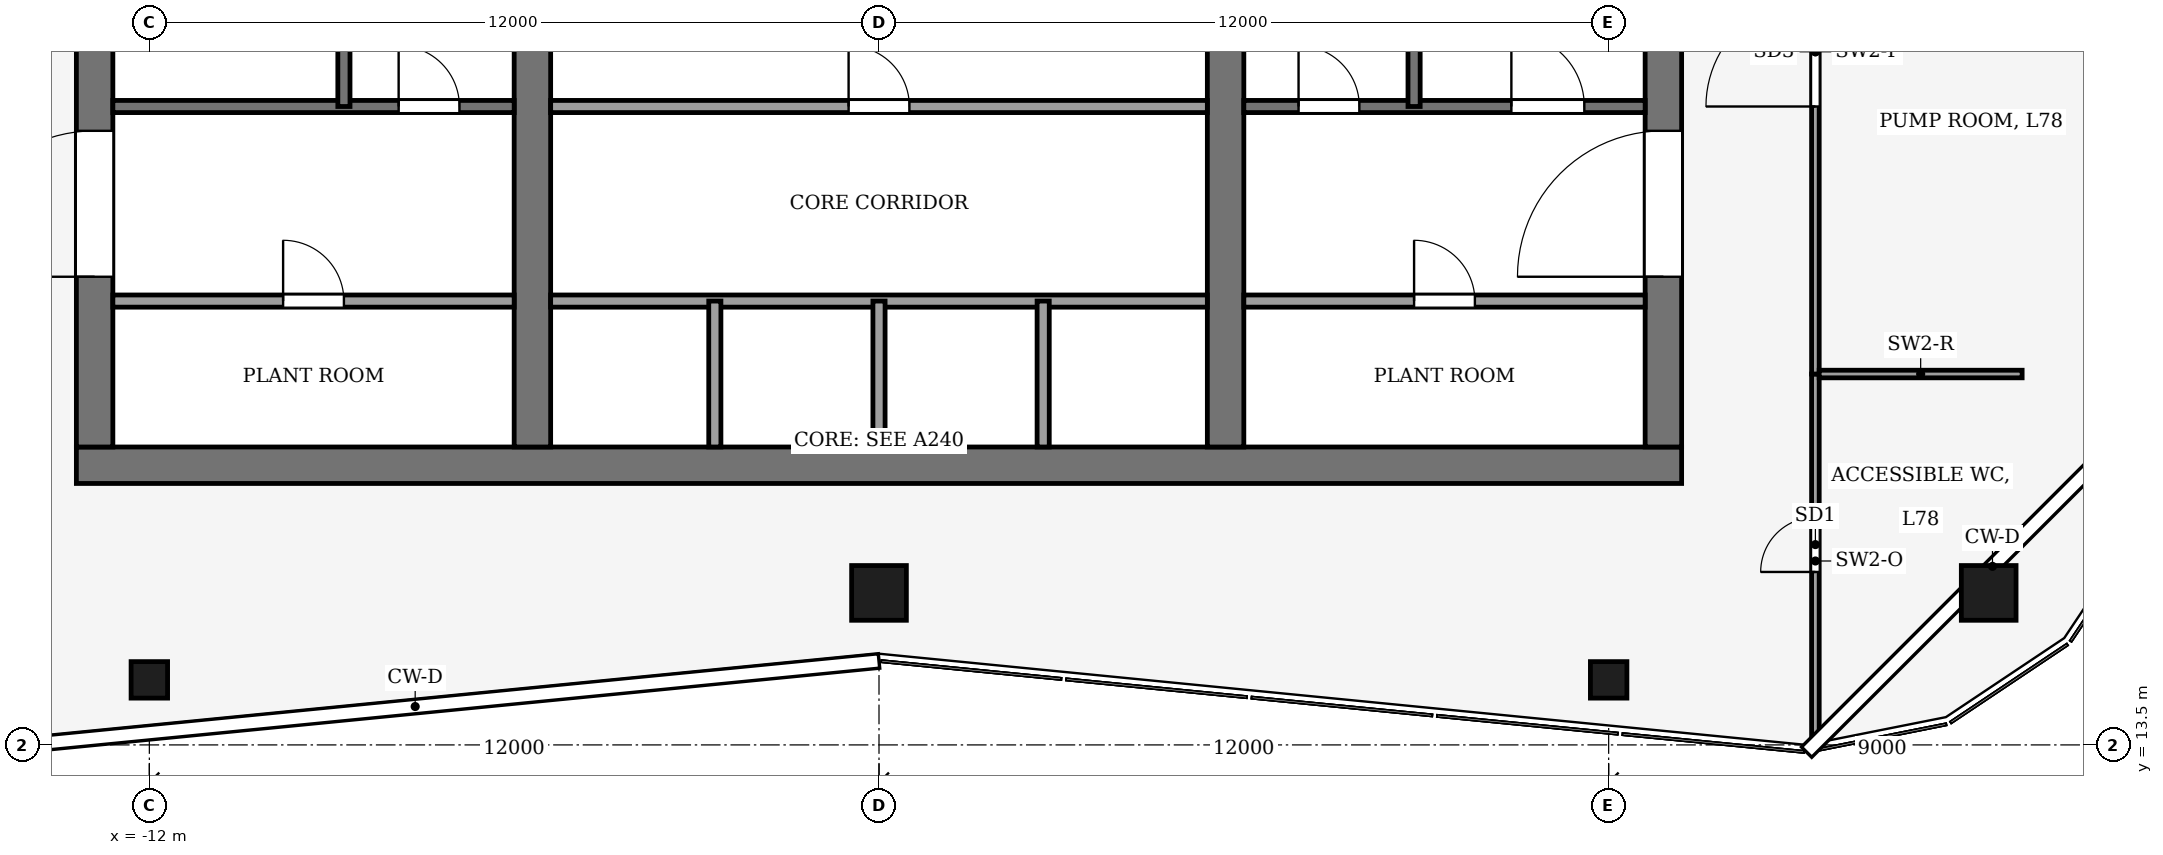
"""IFC4 building model, lengths in metres.
Left out: names, types, materials, properties, quantities, classifications, styles, units other than length and angle.
Written with IfcOpenShell. Run it as: python <this file> out.ifc"""

import sys

from ifc_helpers import new_model, si_unit, direction, frame, frame_2d, origin, origin_2d, place, context, subcontext, project, spatial, rectangle, hollow_rectangle, extrude, element, fill, save


model = new_model("IFC4")
c1 = context("Model", 3, precision=1e-05, world=origin(), true_north=direction((0.0, 1.0)))
c2 = subcontext(c1, "Body", "Model", "MODEL_VIEW")
j1 = project(units=[si_unit("LENGTHUNIT", "METRE"), si_unit("PLANEANGLEUNIT", "RADIAN")], contexts=[c1])
p1 = place(None, origin())
s1 = spatial("IfcSite", under=j1, at=p1, CompositionType="ELEMENT")
p2 = place(p1, origin())
s2 = spatial("IfcBuilding", under=s1, at=p2, CompositionType="ELEMENT")
p3 = place(p2, frame((0.0, 0.0, 340.5)))
s3 = spatial("IfcBuildingStorey", under=s2, at=p3, CompositionType="ELEMENT", Elevation=340.5)
p4 = place(p3, frame((-13.2, 18.1, -0.15), z_axis=(0.0, 0.0, 1.0), x_axis=(1.0, 0.0, 0.0)))
e1 = element("IfcWall", 1, at=p4, inside=s3, PredefinedType="SHEAR", context=c2, shape_type="SweptSolid", body=[
    extrude(rectangle(XDim=26.4, YDim=0.6, at=frame_2d((13.2, 0.0))), origin(), (0.0, 0.0, 1.0), 9.0),
])
p5 = place(p3, frame((-12.9, 18.4, -0.15), z_axis=(0.0, 0.0, 1.0), x_axis=(0.0, 1.0, 0.0)))
e2 = element("IfcWall", 2, at=p5, inside=s3, PredefinedType="SHEAR", context=c2, shape_type="SweptSolid", body=[
    extrude(rectangle(XDim=19.2, YDim=0.6, at=frame_2d((9.6, 0.0))), origin(), (0.0, 0.0, 1.0), 9.0),
])
p6 = place(p5, frame((2.8, 0.0, 0.15)))
e3 = element("IfcOpeningElement", 3, at=p6, cuts=e2, PredefinedType="OPENING", context=c2, shape_type="SweptSolid", body=[
    extrude(rectangle(XDim=2.4, YDim=2.4, at=frame_2d((1.2, 1.2))), frame((0.0, 0.31, 0.0), z_axis=(0.0, -1.0, 0.0), x_axis=(1.0, 0.0, 0.0)), (0.0, 0.0, 1.0), 0.62),
])
p7 = place(p5, frame((13.4, 0.0, 0.15)))
e4 = element("IfcOpeningElement", 4, at=p7, cuts=e2, PredefinedType="OPENING", context=c2, shape_type="SweptSolid", body=[
    extrude(rectangle(XDim=1.4, YDim=2.2, at=frame_2d((0.7, 1.1))), frame((0.0, 0.31, 0.0), z_axis=(0.0, -1.0, 0.0), x_axis=(1.0, 0.0, 0.0)), (0.0, 0.0, 1.0), 0.62),
])
p8 = place(p3, frame((12.9, 18.4, -0.15), z_axis=(0.0, 0.0, 1.0), x_axis=(0.0, 1.0, 0.0)))
e5 = element("IfcWall", 5, at=p8, inside=s3, PredefinedType="SHEAR", context=c2, shape_type="SweptSolid", body=[
    extrude(rectangle(XDim=19.2, YDim=0.6, at=frame_2d((9.6, 0.0))), origin(), (0.0, 0.0, 1.0), 9.0),
])
p9 = place(p8, frame((2.8, 0.0, 0.15)))
e6 = element("IfcOpeningElement", 6, at=p9, cuts=e5, PredefinedType="OPENING", context=c2, shape_type="SweptSolid", body=[
    extrude(rectangle(XDim=2.4, YDim=2.4, at=frame_2d((1.2, 1.2))), frame((0.0, 0.31, 0.0), z_axis=(0.0, -1.0, 0.0), x_axis=(1.0, 0.0, 0.0)), (0.0, 0.0, 1.0), 0.62),
])
p10 = place(p8, frame((13.3, 0.0, 0.15)))
e7 = element("IfcOpeningElement", 7, at=p10, cuts=e5, PredefinedType="OPENING", context=c2, shape_type="SweptSolid", body=[
    extrude(rectangle(XDim=2.4, YDim=2.4, at=frame_2d((1.2, 1.2))), frame((0.0, 0.31, 0.0), z_axis=(0.0, -1.0, 0.0), x_axis=(1.0, 0.0, 0.0)), (0.0, 0.0, 1.0), 0.62),
])
p11 = place(p3, frame((-5.7, 18.4, -0.15), z_axis=(0.0, 0.0, 1.0), x_axis=(0.0, 1.0, 0.0)))
e8 = element("IfcWall", 8, at=p11, inside=s3, PredefinedType="SHEAR", context=c2, shape_type="SweptSolid", body=[
    extrude(rectangle(XDim=19.2, YDim=0.6, at=frame_2d((9.6, 0.0))), origin(), (0.0, 0.0, 1.0), 9.0),
])
p12 = place(p11, frame((8.35, 0.0, 0.15)))
e9 = element("IfcOpeningElement", 9, at=p12, cuts=e8, PredefinedType="OPENING", context=c2, shape_type="SweptSolid", body=[
    extrude(rectangle(XDim=0.9, YDim=2.1, at=frame_2d((0.45, 1.05))), frame((0.0, 0.31, 0.0), z_axis=(0.0, -1.0, 0.0), x_axis=(1.0, 0.0, 0.0)), (0.0, 0.0, 1.0), 0.62),
])
p13 = place(p3, frame((5.7, 18.4, -0.15), z_axis=(0.0, 0.0, 1.0), x_axis=(0.0, 1.0, 0.0)))
e10 = element("IfcWall", 10, at=p13, inside=s3, PredefinedType="SHEAR", context=c2, shape_type="SweptSolid", body=[
    extrude(rectangle(XDim=19.2, YDim=0.6, at=frame_2d((9.6, 0.0))), origin(), (0.0, 0.0, 1.0), 9.0),
])
p14 = place(p13, frame((13.3, 0.0, 0.15)))
e11 = element("IfcOpeningElement", 11, at=p14, cuts=e10, PredefinedType="OPENING", context=c2, shape_type="SweptSolid", body=[
    extrude(rectangle(XDim=2.4, YDim=2.4, at=frame_2d((1.2, 1.2))), frame((0.0, 0.31, 0.0), z_axis=(0.0, -1.0, 0.0), x_axis=(1.0, 0.0, 0.0)), (0.0, 0.0, 1.0), 0.62),
])
for number, where, z_axis, x_axis in (
    (12, (18.25, 16.0, 0.0), (0.0, 0.0, 1.0), (1.0, 0.0, 0.0)),
    (13, (0.0, 16.0, 0.0), (0.0, 0.0, 1.0), (1.0, 0.0, 0.0)),
):
    element("IfcColumn", number, at=place(p3, frame(where, z_axis=z_axis, x_axis=x_axis)), inside=s3, PredefinedType="COLUMN", context=c2, shape_type="SweptSolid", body=[
        extrude(hollow_rectangle(XDim=0.9, YDim=0.9, WallThickness=0.04, at=origin_2d()), origin(), (0.0, 0.0, 1.0), 9.0),
    ])
for number, where, z_axis, x_axis in (
    (14, (-12.0, 14.57, 0.0), (0.0, 0.0, 1.0), (1.0, 0.0, 0.0)),
    (15, (12.0, 14.57, 0.0), (0.0, 0.0, 1.0), (1.0, 0.0, 0.0)),
):
    element("IfcColumn", number, at=place(p3, frame(where, z_axis=z_axis, x_axis=x_axis)), inside=s3, PredefinedType="COLUMN", context=c2, shape_type="SweptSolid", body=[
        extrude(hollow_rectangle(XDim=0.6, YDim=0.6, WallThickness=0.025, at=origin_2d()), origin(), (0.0, 0.0, 1.0), 9.0),
    ])
p15 = place(p3, frame((-12.6, 20.8, 0.0), z_axis=(0.0, 0.0, 1.0), x_axis=(1.0, 0.0, 0.0)))
e16 = element("IfcWall", 16, at=p15, inside=s3, PredefinedType="PARTITIONING", context=c2, shape_type="SweptSolid", body=[
    extrude(rectangle(XDim=6.6, YDim=0.2, at=frame_2d((3.3, 0.0))), origin(), (0.0, 0.0, 1.0), 8.85),
])
p16 = place(p15, frame((2.8, 0.0, 0.0)))
e17 = element("IfcOpeningElement", 17, at=p16, cuts=e16, PredefinedType="OPENING", context=c2, shape_type="SweptSolid", body=[
    extrude(rectangle(XDim=1.0, YDim=2.1, at=frame_2d((0.5, 1.05))), frame((0.0, 0.11, 0.0), z_axis=(0.0, -1.0, 0.0), x_axis=(1.0, 0.0, 0.0)), (0.0, 0.0, 1.0), 0.22),
])
p17 = place(p3, frame((-5.4, 20.8, 0.0), z_axis=(0.0, 0.0, 1.0), x_axis=(1.0, 0.0, 0.0)))
e18 = element("IfcWall", 18, at=p17, inside=s3, PredefinedType="PARTITIONING", context=c2, shape_type="SweptSolid", body=[
    extrude(rectangle(XDim=10.8, YDim=0.2, at=frame_2d((5.4, 0.0))), origin(), (0.0, 0.0, 1.0), 8.85),
])
p18 = place(p3, frame((6.0, 20.8, 0.0), z_axis=(0.0, 0.0, 1.0), x_axis=(1.0, 0.0, 0.0)))
e19 = element("IfcWall", 19, at=p18, inside=s3, PredefinedType="PARTITIONING", context=c2, shape_type="SweptSolid", body=[
    extrude(rectangle(XDim=6.6, YDim=0.2, at=frame_2d((3.3, 0.0))), origin(), (0.0, 0.0, 1.0), 8.85),
])
p19 = place(p18, frame((2.8, 0.0, 0.0)))
e20 = element("IfcOpeningElement", 20, at=p19, cuts=e19, PredefinedType="OPENING", context=c2, shape_type="SweptSolid", body=[
    extrude(rectangle(XDim=1.0, YDim=2.1, at=frame_2d((0.5, 1.05))), frame((0.0, 0.11, 0.0), z_axis=(0.0, -1.0, 0.0), x_axis=(1.0, 0.0, 0.0)), (0.0, 0.0, 1.0), 0.22),
])
p20 = place(p3, frame((-12.6, 24.0, 0.0), z_axis=(0.0, 0.0, 1.0), x_axis=(1.0, 0.0, 0.0)))
e21 = element("IfcWall", 21, at=p20, inside=s3, PredefinedType="PARTITIONING", context=c2, shape_type="SweptSolid", body=[
    extrude(rectangle(XDim=6.6, YDim=0.2, at=frame_2d((3.3, 0.0))), origin(), (0.0, 0.0, 1.0), 8.85),
])
p21 = place(p20, frame((4.7, 0.0, 0.0)))
e22 = element("IfcOpeningElement", 22, at=p21, cuts=e21, PredefinedType="OPENING", context=c2, shape_type="SweptSolid", body=[
    extrude(rectangle(XDim=1.0, YDim=2.1, at=frame_2d((0.5, 1.05))), frame((0.0, 0.11, 0.0), z_axis=(0.0, -1.0, 0.0), x_axis=(1.0, 0.0, 0.0)), (0.0, 0.0, 1.0), 0.22),
])
p22 = place(p3, frame((-5.4, 24.0, 0.0), z_axis=(0.0, 0.0, 1.0), x_axis=(1.0, 0.0, 0.0)))
e23 = element("IfcWall", 23, at=p22, inside=s3, PredefinedType="PARTITIONING", context=c2, shape_type="SweptSolid", body=[
    extrude(rectangle(XDim=10.8, YDim=0.2, at=frame_2d((5.4, 0.0))), origin(), (0.0, 0.0, 1.0), 8.85),
])
p23 = place(p22, frame((4.9, 0.0, 0.0)))
e24 = element("IfcOpeningElement", 24, at=p23, cuts=e23, PredefinedType="OPENING", context=c2, shape_type="SweptSolid", body=[
    extrude(rectangle(XDim=1.0, YDim=2.1, at=frame_2d((0.5, 1.05))), frame((0.0, 0.11, 0.0), z_axis=(0.0, -1.0, 0.0), x_axis=(1.0, 0.0, 0.0)), (0.0, 0.0, 1.0), 0.22),
])
p24 = place(p3, frame((6.0, 24.0, 0.0), z_axis=(0.0, 0.0, 1.0), x_axis=(1.0, 0.0, 0.0)))
e25 = element("IfcWall", 25, at=p24, inside=s3, PredefinedType="PARTITIONING", context=c2, shape_type="SweptSolid", body=[
    extrude(rectangle(XDim=6.6, YDim=0.2, at=frame_2d((3.3, 0.0))), origin(), (0.0, 0.0, 1.0), 8.85),
])
p25 = place(p24, frame((0.9, 0.0, 0.0)))
e26 = element("IfcOpeningElement", 26, at=p25, cuts=e25, PredefinedType="OPENING", context=c2, shape_type="SweptSolid", body=[
    extrude(rectangle(XDim=1.0, YDim=2.1, at=frame_2d((0.5, 1.05))), frame((0.0, 0.11, 0.0), z_axis=(0.0, -1.0, 0.0), x_axis=(1.0, 0.0, 0.0)), (0.0, 0.0, 1.0), 0.22),
])
p26 = place(p24, frame((4.4, 0.0, 0.0)))
e27 = element("IfcOpeningElement", 27, at=p26, cuts=e25, PredefinedType="OPENING", context=c2, shape_type="SweptSolid", body=[
    extrude(rectangle(XDim=1.2, YDim=2.2, at=frame_2d((0.6, 1.1))), frame((0.0, 0.11, 0.0), z_axis=(0.0, -1.0, 0.0), x_axis=(1.0, 0.0, 0.0)), (0.0, 0.0, 1.0), 0.22),
])
p27 = place(p3, frame((-8.8, 24.0, 0.0), z_axis=(0.0, 0.0, 1.0), x_axis=(0.0, 1.0, 0.0)))
e28 = element("IfcWall", 28, at=p27, inside=s3, PredefinedType="PARTITIONING", context=c2, shape_type="SweptSolid", body=[
    extrude(rectangle(XDim=7.4, YDim=0.2, at=frame_2d((3.7, 0.0))), origin(), (0.0, 0.0, 1.0), 8.85),
])
for number, where, z_axis, x_axis in (
    (29, (-2.7, 18.4, 0.0), (0.0, 0.0, 1.0), (0.0, 1.0, 0.0)),
    (30, (0.0, 18.4, 0.0), (0.0, 0.0, 1.0), (0.0, 1.0, 0.0)),
    (31, (2.7, 18.4, 0.0), (0.0, 0.0, 1.0), (0.0, 1.0, 0.0)),
):
    element("IfcWall", number, at=place(p3, frame(where, z_axis=z_axis, x_axis=x_axis)), inside=s3, PredefinedType="PARTITIONING", context=c2, shape_type="SweptSolid", body=[
        extrude(rectangle(XDim=2.4, YDim=0.2, at=frame_2d((1.2, 0.0))), origin(), (0.0, 0.0, 1.0), 8.85),
    ])
p28 = place(p3, frame((8.8, 24.0, 0.0), z_axis=(0.0, 0.0, 1.0), x_axis=(0.0, 1.0, 0.0)))
e32 = element("IfcWall", 32, at=p28, inside=s3, PredefinedType="PARTITIONING", context=c2, shape_type="SweptSolid", body=[
    extrude(rectangle(XDim=7.4, YDim=0.2, at=frame_2d((3.7, 0.0))), origin(), (0.0, 0.0, 1.0), 8.85),
])
p29 = place(p3, frame((15.4, 13.45, 0.0), z_axis=(0.0, 0.0, 1.0), x_axis=(0.0, 1.0, 0.0)))
e33 = element("IfcWall", 33, at=p29, inside=s3, PredefinedType="PARTITIONING", context=c2, shape_type="SweptSolid", body=[
    extrude(rectangle(XDim=6.15, YDim=0.125, at=frame_2d((3.075, 0.0))), origin(), (0.0, 0.0, 1.0), 7.812),
])
p30 = place(p29, frame((2.895, 0.0, 0.0)))
e34 = element("IfcOpeningElement", 34, at=p30, cuts=e33, PredefinedType="OPENING", context=c2, shape_type="SweptSolid", body=[
    extrude(rectangle(XDim=0.9, YDim=2.1, at=frame_2d((0.45, 1.05))), frame((0.0, 0.073, 0.0), z_axis=(0.0, -1.0, 0.0), x_axis=(1.0, 0.0, 0.0)), (0.0, 0.0, 1.0), 0.145),
])
p31 = place(p3, frame((15.4, 19.6, 0.0), z_axis=(0.0, 0.0, 1.0), x_axis=(0.0, 1.0, 0.0)))
e35 = element("IfcWall", 35, at=p31, inside=s3, PredefinedType="PARTITIONING", context=c2, shape_type="SweptSolid", body=[
    extrude(rectangle(XDim=10.6, YDim=0.125, at=frame_2d((5.3, 0.0))), origin(), (0.0, 0.0, 1.0), 8.52),
])
p32 = place(p31, frame((4.4, 0.0, 0.0)))
e36 = element("IfcOpeningElement", 36, at=p32, cuts=e35, PredefinedType="OPENING", context=c2, shape_type="SweptSolid", body=[
    extrude(rectangle(XDim=1.8, YDim=2.4, at=frame_2d((0.9, 1.2))), frame((0.0, 0.073, 0.0), z_axis=(0.0, -1.0, 0.0), x_axis=(1.0, 0.0, 0.0)), (0.0, 0.0, 1.0), 0.145),
])
p33 = place(p3, frame((15.462, 19.6, 0.0), z_axis=(0.0, 0.0, 1.0), x_axis=(1.0, 0.0, 0.0)))
e37 = element("IfcWall", 37, at=p33, inside=s3, PredefinedType="PARTITIONING", context=c2, shape_type="SweptSolid", body=[
    extrude(rectangle(XDim=3.338, YDim=0.125, at=frame_2d((1.669, 0.0))), origin(), (0.0, 0.0, 1.0), 8.85),
])
p34 = place(p23, origin())
e38 = element("IfcDoor", 38, at=p34, inside=s3, OperationType="SINGLE_SWING_LEFT", PredefinedType="DOOR", context=c2, shape_type="SweptSolid", body=[
    extrude(rectangle(XDim=1.0, YDim=2.1, at=frame_2d((0.5, 1.05))), frame((0.0, 0.025, 0.0), z_axis=(0.0, -1.0, 0.0), x_axis=(1.0, 0.0, 0.0)), (0.0, 0.0, 1.0), 0.05),
])
fill(e24, e38)
p35 = place(p16, origin())
e39 = element("IfcDoor", 39, at=p35, inside=s3, OperationType="SINGLE_SWING_RIGHT", PredefinedType="DOOR", context=c2, shape_type="SweptSolid", body=[
    extrude(rectangle(XDim=1.0, YDim=2.1, at=frame_2d((0.5, 1.05))), frame((0.0, 0.025, 0.0), z_axis=(0.0, -1.0, 0.0), x_axis=(1.0, 0.0, 0.0)), (0.0, 0.0, 1.0), 0.05),
])
fill(e17, e39)
p36 = place(p19, origin())
e40 = element("IfcDoor", 40, at=p36, inside=s3, OperationType="SINGLE_SWING_LEFT", PredefinedType="DOOR", context=c2, shape_type="SweptSolid", body=[
    extrude(rectangle(XDim=1.0, YDim=2.1, at=frame_2d((0.5, 1.05))), frame((0.0, 0.025, 0.0), z_axis=(0.0, -1.0, 0.0), x_axis=(1.0, 0.0, 0.0)), (0.0, 0.0, 1.0), 0.05),
])
fill(e20, e40)
p37 = place(p21, origin())
e41 = element("IfcDoor", 41, at=p37, inside=s3, OperationType="SINGLE_SWING_LEFT", PredefinedType="DOOR", context=c2, shape_type="SweptSolid", body=[
    extrude(rectangle(XDim=1.0, YDim=2.1, at=frame_2d((0.5, 1.05))), frame((0.0, 0.025, 0.0), z_axis=(0.0, -1.0, 0.0), x_axis=(1.0, 0.0, 0.0)), (0.0, 0.0, 1.0), 0.05),
])
fill(e22, e41)
p38 = place(p25, origin())
e42 = element("IfcDoor", 42, at=p38, inside=s3, OperationType="SINGLE_SWING_RIGHT", PredefinedType="DOOR", context=c2, shape_type="SweptSolid", body=[
    extrude(rectangle(XDim=1.0, YDim=2.1, at=frame_2d((0.5, 1.05))), frame((0.0, 0.025, 0.0), z_axis=(0.0, -1.0, 0.0), x_axis=(1.0, 0.0, 0.0)), (0.0, 0.0, 1.0), 0.05),
])
fill(e26, e42)
p39 = place(p26, origin())
e43 = element("IfcDoor", 43, at=p39, inside=s3, OperationType="SINGLE_SWING_RIGHT", PredefinedType="DOOR", context=c2, shape_type="SweptSolid", body=[
    extrude(rectangle(XDim=1.2, YDim=2.2, at=frame_2d((0.6, 1.1))), frame((0.0, 0.025, 0.0), z_axis=(0.0, -1.0, 0.0), x_axis=(1.0, 0.0, 0.0)), (0.0, 0.0, 1.0), 0.05),
])
fill(e27, e43)
p40 = place(p6, origin())
e44 = element("IfcDoor", 44, at=p40, inside=s3, OperationType="DOUBLE_DOOR_SINGLE_SWING", PredefinedType="DOOR", context=c2, shape_type="SweptSolid", body=[
    extrude(rectangle(XDim=2.4, YDim=2.4, at=frame_2d((1.2, 1.2))), frame((0.0, 0.025, 0.0), z_axis=(0.0, -1.0, 0.0), x_axis=(1.0, 0.0, 0.0)), (0.0, 0.0, 1.0), 0.05),
])
fill(e3, e44)
p41 = place(p9, origin())
e45 = element("IfcDoor", 45, at=p41, inside=s3, OperationType="DOUBLE_DOOR_SINGLE_SWING", PredefinedType="DOOR", context=c2, shape_type="SweptSolid", body=[
    extrude(rectangle(XDim=2.4, YDim=2.4, at=frame_2d((1.2, 1.2))), frame((0.0, 0.025, 0.0), z_axis=(0.0, -1.0, 0.0), x_axis=(1.0, 0.0, 0.0)), (0.0, 0.0, 1.0), 0.05),
])
fill(e6, e45)
p42 = place(p30, origin())
e46 = element("IfcDoor", 46, at=p42, inside=s3, OperationType="SINGLE_SWING_RIGHT", PredefinedType="DOOR", context=c2, shape_type="SweptSolid", body=[
    extrude(rectangle(XDim=0.9, YDim=2.1, at=frame_2d((0.45, 1.05))), frame((0.0, 0.025, 0.0), z_axis=(0.0, -1.0, 0.0), x_axis=(1.0, 0.0, 0.0)), (0.0, 0.0, 1.0), 0.05),
])
fill(e34, e46)
p43 = place(p32, origin())
e47 = element("IfcDoor", 47, at=p43, inside=s3, OperationType="DOUBLE_DOOR_SINGLE_SWING", PredefinedType="DOOR", context=c2, shape_type="SweptSolid", body=[
    extrude(rectangle(XDim=1.8, YDim=2.4, at=frame_2d((0.9, 1.2))), frame((0.0, 0.025, 0.0), z_axis=(0.0, -1.0, 0.0), x_axis=(1.0, 0.0, 0.0)), (0.0, 0.0, 1.0), 0.05),
])
fill(e36, e47)
save(model, sys.argv[1])
